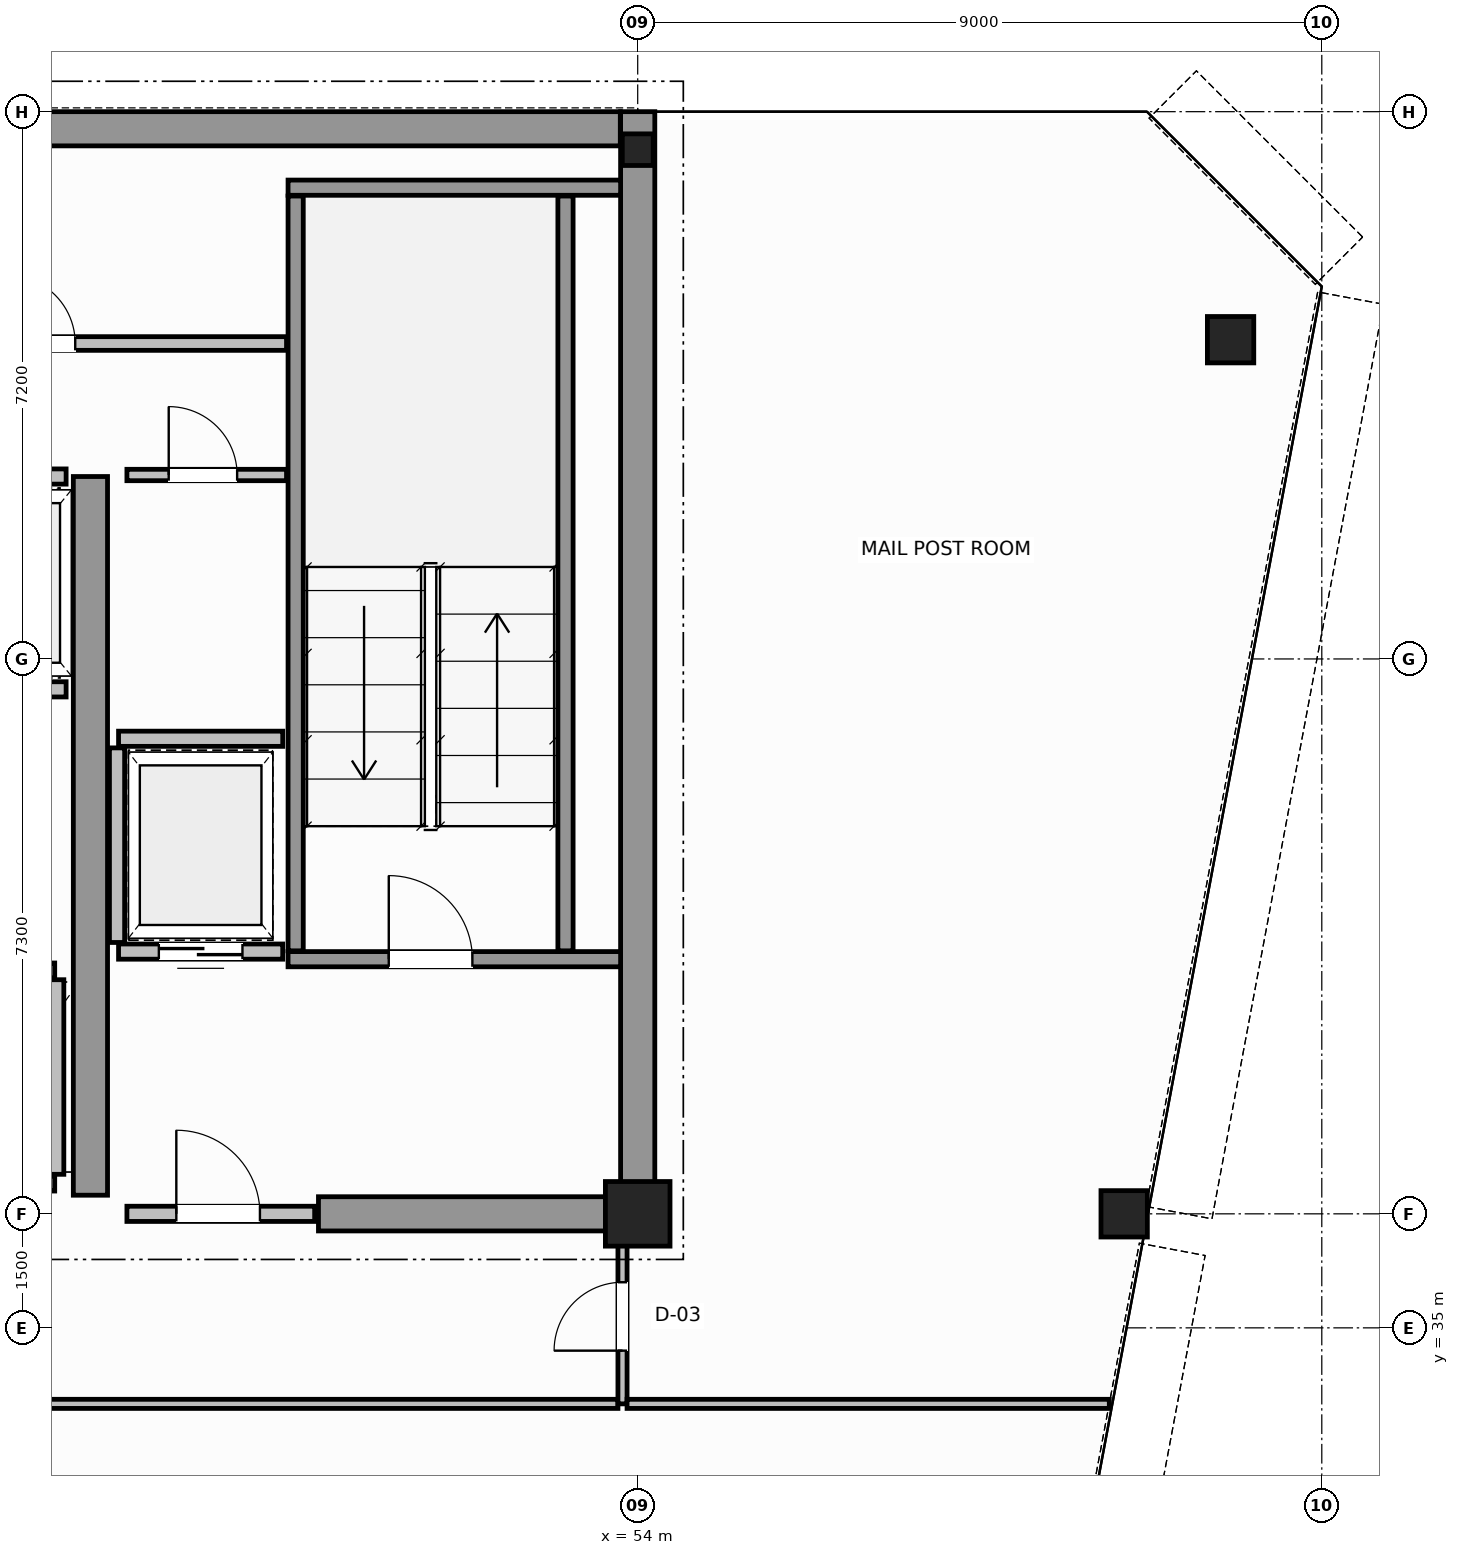
"""IFC4 building model, lengths in metres.
Left out: names, types, materials, properties, quantities, classifications, styles, units other than length and angle.
Written with IfcOpenShell. Run it as: python <this file> out.ifc"""

import sys

from ifc_helpers import new_model, si_unit, direction, frame, frame_2d, origin, origin_2d, place, context, subcontext, project, spatial, rectangle, hollow_circle, i_section, extrude, source, transform, mapped, element, fill, save


model = new_model("IFC4")
c1 = context("Model", 3, precision=1e-05, world=origin(), true_north=direction((0.0, 1.0)))
c2 = subcontext(c1, "Body", "Model", "MODEL_VIEW")
j1 = project(units=[si_unit("LENGTHUNIT", "METRE"), si_unit("PLANEANGLEUNIT", "RADIAN")], contexts=[c1])
p1 = place(None, origin())
s1 = spatial("IfcSite", under=j1, at=p1, CompositionType="ELEMENT")
p2 = place(p1, origin())
s2 = spatial("IfcBuilding", under=s1, at=p2, CompositionType="ELEMENT")
p3 = place(p2, frame((0.0, 0.0, 276.4)))
s3 = spatial("IfcBuildingStorey", under=s2, at=p3, CompositionType="ELEMENT", Elevation=276.4)
m1 = source(origin(), c2, "Body", "SweptSolid", [
    extrude(rectangle(XDim=0.85, YDim=0.85, at=origin_2d()), origin(), (0.0, 0.0, 1.0), 3.8),
])
p4 = place(p3, frame((54.0, 36.5, 0.0), z_axis=(0.0, 0.0, 1.0), x_axis=(1.0, 0.0, 0.0)))
e1 = element("IfcColumn", 1, at=p4, inside=s3, PredefinedType="COLUMN", context=c2, shape_type="MappedRepresentation", body=[
    mapped(m1, transform((0.0, 0.0, 0.0), scale=1.0)),
])
m2 = source(origin(), c2, "Body", "SweptSolid", [
    extrude(i_section(OverallWidth=0.406, OverallDepth=0.416, WebThickness=0.03, FlangeThickness=0.042, FilletRadius=0.015, at=origin_2d()), origin(), (0.0, 0.0, 1.0), 3.8),
])
p5 = place(p3, frame((54.0, 50.5, 0.0), z_axis=(0.0, 0.0, 1.0), x_axis=(1.0, 0.0, 0.0)))
e2 = element("IfcColumn", 2, at=p5, inside=s3, PredefinedType="COLUMN", context=c2, shape_type="MappedRepresentation", body=[
    mapped(m2, transform((0.0, 0.0, 0.0), scale=1.0)),
])
m3 = source(origin(), c2, "Body", "SweptSolid", [
    extrude(hollow_circle(Radius=0.305, WallThickness=0.03, at=origin_2d()), origin(), (0.0, 0.0, 1.0), 3.8),
])
for number, where, z_axis, x_axis in (
    (3, (61.8, 48.0, 0.0), (0.0, 0.0, 1.0), (1.0, 0.0, 0.0)),
    (4, (60.4, 36.5, 0.0), (0.0, 0.0, 1.0), (1.0, 0.0, 0.0)),
):
    element("IfcColumn", number, at=place(p3, frame(where, z_axis=z_axis, x_axis=x_axis)), inside=s3, PredefinedType="COLUMN", context=c2, shape_type="MappedRepresentation", body=[
        mapped(m3, transform((0.0, 0.0, 0.0), scale=1.0)),
    ])
p6 = place(p3, frame((34.002, 50.775, 0.0), z_axis=(0.0, 0.0, 1.0), x_axis=(1.0, 0.0, 0.0)))
e5 = element("IfcWall", 5, at=p6, inside=s3, PredefinedType="SHEAR", context=c2, shape_type="SweptSolid", body=[
    extrude(rectangle(XDim=19.769, YDim=0.45, at=frame_2d((9.885, 0.0))), origin(), (0.0, 0.0, 1.0), 3.8),
])
p7 = place(p3, frame((54.0, 36.5, 0.0), z_axis=(0.0, 0.0, 1.0), x_axis=(0.0, 1.0, 0.0)))
e6 = element("IfcWall", 6, at=p7, inside=s3, PredefinedType="SHEAR", context=c2, shape_type="SweptSolid", body=[
    extrude(rectangle(XDim=14.5, YDim=0.45, at=frame_2d((7.25, 0.0))), origin(), (0.0, 0.0, 1.0), 3.8),
])
p8 = place(p3, frame((49.8, 36.5, 0.0), z_axis=(0.0, 0.0, 1.0), x_axis=(1.0, 0.0, 0.0)))
e7 = element("IfcWall", 7, at=p8, inside=s3, PredefinedType="SHEAR", context=c2, shape_type="SweptSolid", body=[
    extrude(rectangle(XDim=3.955, YDim=0.45, at=frame_2d((1.978, 0.0))), origin(), (0.0, 0.0, 1.0), 2.58),
])
p9 = place(p3, frame((46.8, 36.745, 0.0), z_axis=(0.0, 0.0, 1.0), x_axis=(0.0, 1.0, 0.0)))
e8 = element("IfcWall", 8, at=p9, inside=s3, PredefinedType="SHEAR", context=c2, shape_type="SweptSolid", body=[
    extrude(rectangle(XDim=9.455, YDim=0.45, at=frame_2d((4.728, 0.0))), origin(), (0.0, 0.0, 1.0), 3.8),
])
p10 = place(p3, frame((49.4, 39.85, 0.0), z_axis=(0.0, 0.0, 1.0), x_axis=(1.0, 0.0, 0.0)))
e9 = element("IfcWall", 9, at=p10, inside=s3, PredefinedType="SOLIDWALL", context=c2, shape_type="SweptSolid", body=[
    extrude(rectangle(XDim=4.375, YDim=0.2, at=frame_2d((2.188, 0.0))), origin(), (0.0, 0.0, 1.0), 3.8),
])
p11 = place(p10, frame((1.325, 0.0, 0.0)))
e10 = element("IfcOpeningElement", 10, at=p11, cuts=e9, PredefinedType="OPENING", context=c2, shape_type="SweptSolid", body=[
    extrude(rectangle(XDim=1.1, YDim=2.15, at=frame_2d((0.55, 1.075))), frame((0.0, 0.11, 0.0), z_axis=(0.0, -1.0, 0.0), x_axis=(1.0, 0.0, 0.0)), (0.0, 0.0, 1.0), 0.22),
])
p12 = place(p3, frame((49.4, 50.0, 0.0), z_axis=(0.0, 0.0, 1.0), x_axis=(1.0, 0.0, 0.0)))
e11 = element("IfcWall", 11, at=p12, inside=s3, PredefinedType="SOLIDWALL", context=c2, shape_type="SweptSolid", body=[
    extrude(rectangle(XDim=4.375, YDim=0.2, at=frame_2d((2.188, 0.0))), origin(), (0.0, 0.0, 1.0), 3.8),
])
for number, where, z_axis, x_axis in (
    (12, (49.5, 39.96, 0.0), (0.0, 0.0, 1.0), (0.0, 1.0, 0.0)),
    (13, (53.05, 39.96, 0.0), (0.0, 0.0, 1.0), (0.0, 1.0, 0.0)),
):
    element("IfcWall", number, at=place(p3, frame(where, z_axis=z_axis, x_axis=x_axis)), inside=s3, PredefinedType="SOLIDWALL", context=c2, shape_type="SweptSolid", body=[
        extrude(rectangle(XDim=9.93, YDim=0.2, at=frame_2d((4.965, 0.0))), origin(), (0.0, 0.0, 1.0), 3.8),
    ])
p13 = place(p3, frame((47.28, 36.5, 0.0), z_axis=(0.0, 0.0, 1.0), x_axis=(1.0, 0.0, 0.0)))
e14 = element("IfcWall", 14, at=p13, inside=s3, PredefinedType="SOLIDWALL", context=c2, shape_type="SweptSolid", body=[
    extrude(rectangle(XDim=2.47, YDim=0.2, at=frame_2d((1.235, 0.0))), origin(), (0.0, 0.0, 1.0), 2.57),
])
p14 = place(p13, frame((0.65, 0.0, 0.0)))
e15 = element("IfcOpeningElement", 15, at=p14, cuts=e14, PredefinedType="OPENING", context=c2, shape_type="SweptSolid", body=[
    extrude(rectangle(XDim=1.1, YDim=2.15, at=frame_2d((0.55, 1.075))), frame((0.0, 0.11, 0.0), z_axis=(0.0, -1.0, 0.0), x_axis=(1.0, 0.0, 0.0)), (0.0, 0.0, 1.0), 0.22),
])
p15 = place(p3, frame((44.37, 39.7, 0.0), z_axis=(0.0, 0.0, 1.0), x_axis=(1.0, 0.0, 0.0)))
e16 = element("IfcWall", 16, at=p15, inside=s3, PredefinedType="SOLIDWALL", context=c2, shape_type="SweptSolid", body=[
    extrude(rectangle(XDim=1.96, YDim=0.2, at=frame_2d((0.98, 0.0))), origin(), (0.0, 0.0, 1.0), 3.58),
])
p16 = place(p15, frame((0.43, 0.0, 0.0)))
e17 = element("IfcOpeningElement", 17, at=p16, cuts=e16, PredefinedType="OPENING", context=c2, shape_type="SweptSolid", body=[
    extrude(rectangle(XDim=1.1, YDim=2.15, at=frame_2d((0.55, 1.075))), frame((0.0, 0.11, 0.0), z_axis=(0.0, -1.0, 0.0), x_axis=(1.0, 0.0, 0.0)), (0.0, 0.0, 1.0), 0.22),
])
p17 = place(p3, frame((44.37, 36.9, 0.0), z_axis=(0.0, 0.0, 1.0), x_axis=(1.0, 0.0, 0.0)))
e18 = element("IfcWall", 18, at=p17, inside=s3, PredefinedType="SOLIDWALL", context=c2, shape_type="SweptSolid", body=[
    extrude(rectangle(XDim=1.96, YDim=0.2, at=frame_2d((0.98, 0.0))), origin(), (0.0, 0.0, 1.0), 2.57),
])
p18 = place(p3, frame((46.35, 37.02, 0.0), z_axis=(0.0, 0.0, 1.0), x_axis=(0.0, 1.0, 0.0)))
e19 = element("IfcWall", 19, at=p18, inside=s3, PredefinedType="SOLIDWALL", context=c2, shape_type="SweptSolid", body=[
    extrude(rectangle(XDim=2.56, YDim=0.2, at=frame_2d((1.28, 0.0))), origin(), (0.0, 0.0, 1.0), 3.58),
])
p19 = place(p3, frame((44.62, 43.4, 0.0), z_axis=(0.0, 0.0, 1.0), x_axis=(1.0, 0.0, 0.0)))
e20 = element("IfcWall", 20, at=p19, inside=s3, PredefinedType="SOLIDWALL", context=c2, shape_type="SweptSolid", body=[
    extrude(rectangle(XDim=1.86, YDim=0.2, at=frame_2d((0.93, 0.0))), origin(), (0.0, 0.0, 1.0), 3.58),
])
p20 = place(p19, frame((0.38, 0.0, 0.0)))
e21 = element("IfcOpeningElement", 21, at=p20, cuts=e20, PredefinedType="OPENING", context=c2, shape_type="SweptSolid", body=[
    extrude(rectangle(XDim=1.1, YDim=2.15, at=frame_2d((0.55, 1.075))), frame((0.0, 0.11, 0.0), z_axis=(0.0, -1.0, 0.0), x_axis=(1.0, 0.0, 0.0)), (0.0, 0.0, 1.0), 0.22),
])
p21 = place(p3, frame((44.62, 46.2, 0.0), z_axis=(0.0, 0.0, 1.0), x_axis=(1.0, 0.0, 0.0)))
e22 = element("IfcWall", 22, at=p21, inside=s3, PredefinedType="SOLIDWALL", context=c2, shape_type="SweptSolid", body=[
    extrude(rectangle(XDim=1.86, YDim=0.2, at=frame_2d((0.93, 0.0))), origin(), (0.0, 0.0, 1.0), 3.58),
])
p22 = place(p3, frame((47.17, 39.95, 0.0), z_axis=(0.0, 0.0, 1.0), x_axis=(1.0, 0.0, 0.0)))
e23 = element("IfcWall", 23, at=p22, inside=s3, PredefinedType="SOLIDWALL", context=c2, shape_type="SweptSolid", body=[
    extrude(rectangle(XDim=2.16, YDim=0.2, at=frame_2d((1.08, 0.0))), origin(), (0.0, 0.0, 1.0), 3.58),
])
p23 = place(p22, frame((0.53, 0.0, 0.0)))
e24 = element("IfcOpeningElement", 24, at=p23, cuts=e23, PredefinedType="OPENING", context=c2, shape_type="SweptSolid", body=[
    extrude(rectangle(XDim=1.1, YDim=2.15, at=frame_2d((0.55, 1.075))), frame((0.0, 0.11, 0.0), z_axis=(0.0, -1.0, 0.0), x_axis=(1.0, 0.0, 0.0)), (0.0, 0.0, 1.0), 0.22),
])
p24 = place(p3, frame((47.17, 42.75, 0.0), z_axis=(0.0, 0.0, 1.0), x_axis=(1.0, 0.0, 0.0)))
e25 = element("IfcWall", 25, at=p24, inside=s3, PredefinedType="SOLIDWALL", context=c2, shape_type="SweptSolid", body=[
    extrude(rectangle(XDim=2.16, YDim=0.2, at=frame_2d((1.08, 0.0))), origin(), (0.0, 0.0, 1.0), 3.58),
])
p25 = place(p3, frame((47.15, 40.07, 0.0), z_axis=(0.0, 0.0, 1.0), x_axis=(0.0, 1.0, 0.0)))
e26 = element("IfcWall", 26, at=p25, inside=s3, PredefinedType="SOLIDWALL", context=c2, shape_type="SweptSolid", body=[
    extrude(rectangle(XDim=2.56, YDim=0.2, at=frame_2d((1.28, 0.0))), origin(), (0.0, 0.0, 1.0), 3.58),
])
p26 = place(p3, frame((47.28, 46.22, 0.0), z_axis=(0.0, 0.0, 1.0), x_axis=(1.0, 0.0, 0.0)))
e27 = element("IfcWall", 27, at=p26, inside=s3, PredefinedType="PARTITIONING", context=c2, shape_type="SweptSolid", body=[
    extrude(rectangle(XDim=2.1, YDim=0.15, at=frame_2d((1.05, 0.0))), origin(), (0.0, 0.0, 1.0), 3.58),
])
p27 = place(p26, frame((0.55, 0.0, 0.0)))
e28 = element("IfcOpeningElement", 28, at=p27, cuts=e27, PredefinedType="OPENING", context=c2, shape_type="SweptSolid", body=[
    extrude(rectangle(XDim=0.9, YDim=2.1, at=frame_2d((0.45, 1.05))), frame((0.0, 0.085, 0.0), z_axis=(0.0, -1.0, 0.0), x_axis=(1.0, 0.0, 0.0)), (0.0, 0.0, 1.0), 0.17),
])
p28 = place(p3, frame((43.3, 47.95, 0.0), z_axis=(0.0, 0.0, 1.0), x_axis=(1.0, 0.0, 0.0)))
e29 = element("IfcWall", 29, at=p28, inside=s3, PredefinedType="PLUMBINGWALL", context=c2, shape_type="SweptSolid", body=[
    extrude(rectangle(XDim=6.08, YDim=0.18, at=frame_2d((3.04, 0.0))), origin(), (0.0, 0.0, 1.0), 3.58),
])
p29 = place(p28, frame((2.4, 0.0, 0.0)))
e30 = element("IfcOpeningElement", 30, at=p29, cuts=e29, PredefinedType="OPENING", context=c2, shape_type="SweptSolid", body=[
    extrude(rectangle(XDim=0.9, YDim=2.15, at=frame_2d((0.45, 1.075))), frame((0.0, 0.1, 0.0), z_axis=(0.0, -1.0, 0.0), x_axis=(1.0, 0.0, 0.0)), (0.0, 0.0, 1.0), 0.2),
])
p30 = place(p3, frame((34.06, 34.0, 0.0), z_axis=(0.0, 0.0, 1.0), x_axis=(1.0, 0.0, 0.0)))
e31 = element("IfcWall", 31, at=p30, inside=s3, PredefinedType="PARTITIONING", context=c2, shape_type="SweptSolid", body=[
    extrude(rectangle(XDim=19.68, YDim=0.12, at=frame_2d((9.84, 0.0))), origin(), (0.0, 0.0, 1.0), 3.21),
])
p31 = place(p3, frame((53.8, 34.0, 0.0), z_axis=(0.0, 0.0, 1.0), x_axis=(0.0, 1.0, 0.0)))
e32 = element("IfcWall", 32, at=p31, inside=s3, PredefinedType="PARTITIONING", context=c2, shape_type="SweptSolid", body=[
    extrude(rectangle(XDim=2.44, YDim=0.12, at=frame_2d((1.22, 0.0))), origin(), (0.0, 0.0, 1.0), 3.58),
])
p32 = place(p31, frame((0.7, 0.0, 0.0)))
e33 = element("IfcOpeningElement", 33, at=p32, cuts=e32, PredefinedType="OPENING", context=c2, shape_type="SweptSolid", body=[
    extrude(rectangle(XDim=0.9, YDim=2.15, at=frame_2d((0.45, 1.075))), frame((0.0, 0.07, 0.0), z_axis=(0.0, -1.0, 0.0), x_axis=(1.0, 0.0, 0.0)), (0.0, 0.0, 1.0), 0.14),
])
p33 = place(p3, frame((53.86, 34.0, 0.0), z_axis=(0.0, 0.0, 1.0), x_axis=(1.0, 0.0, 0.0)))
e34 = element("IfcWall", 34, at=p33, inside=s3, PredefinedType="PARTITIONING", context=c2, shape_type="SweptSolid", body=[
    extrude(rectangle(XDim=6.344, YDim=0.12, at=frame_2d((3.172, 0.0))), origin(), (0.0, 0.0, 1.0), 3.21),
])
m4 = source(origin(), c2, "Body", "SweptSolid", [
    extrude(rectangle(XDim=1.1, YDim=2.15, at=frame_2d((0.55, 1.075))), frame((0.0, 0.025, 0.0), z_axis=(0.0, -1.0, 0.0), x_axis=(1.0, 0.0, 0.0)), (0.0, 0.0, 1.0), 0.05),
])
p34 = place(p11, origin())
e35 = element("IfcDoor", 35, at=p34, inside=s3, OperationType="SINGLE_SWING_RIGHT", PredefinedType="DOOR", context=c2, shape_type="MappedRepresentation", body=[
    mapped(m4, transform((0.0, 0.0, 0.0), scale=1.0)),
])
fill(e10, e35)
p35 = place(p14, origin())
e36 = element("IfcDoor", 36, at=p35, inside=s3, OperationType="SINGLE_SWING_LEFT", PredefinedType="DOOR", context=c2, shape_type="MappedRepresentation", body=[
    mapped(m4, transform((0.0, 0.0, 0.0), scale=1.0)),
])
fill(e15, e36)
p36 = place(p23, origin())
e37 = element("IfcDoor", 37, at=p36, inside=s3, OperationType="DOUBLE_DOOR_SLIDING", PredefinedType="DOOR", context=c2, shape_type="MappedRepresentation", body=[
    mapped(m4, transform((0.0, 0.0, 0.0), scale=1.0)),
])
fill(e24, e37)
m5 = source(origin(), c2, "Body", "SweptSolid", [
    extrude(rectangle(XDim=0.9, YDim=2.1, at=frame_2d((0.45, 1.05))), frame((0.0, 0.025, 0.0), z_axis=(0.0, -1.0, 0.0), x_axis=(1.0, 0.0, 0.0)), (0.0, 0.0, 1.0), 0.05),
])
p37 = place(p27, origin())
e38 = element("IfcDoor", 38, at=p37, inside=s3, OperationType="SINGLE_SWING_RIGHT", PredefinedType="DOOR", context=c2, shape_type="MappedRepresentation", body=[
    mapped(m5, transform((0.0, 0.0, 0.0), scale=1.0)),
])
fill(e28, e38)
m6 = source(origin(), c2, "Body", "SweptSolid", [
    extrude(rectangle(XDim=0.9, YDim=2.15, at=frame_2d((0.45, 1.075))), frame((0.0, 0.025, 0.0), z_axis=(0.0, -1.0, 0.0), x_axis=(1.0, 0.0, 0.0)), (0.0, 0.0, 1.0), 0.05),
])
p38 = place(p29, origin())
e39 = element("IfcDoor", 39, at=p38, inside=s3, OperationType="SINGLE_SWING_RIGHT", PredefinedType="DOOR", context=c2, shape_type="MappedRepresentation", body=[
    mapped(m6, transform((0.0, 0.0, 0.0), scale=1.0)),
])
fill(e30, e39)
p39 = place(p32, origin())
e40 = element("IfcDoor", 40, at=p39, inside=s3, OperationType="SINGLE_SWING_RIGHT", PredefinedType="DOOR", context=c2, shape_type="MappedRepresentation", body=[
    mapped(m6, transform((0.0, 0.0, 0.0), scale=1.0)),
])
fill(e33, e40)
save(model, sys.argv[1])
